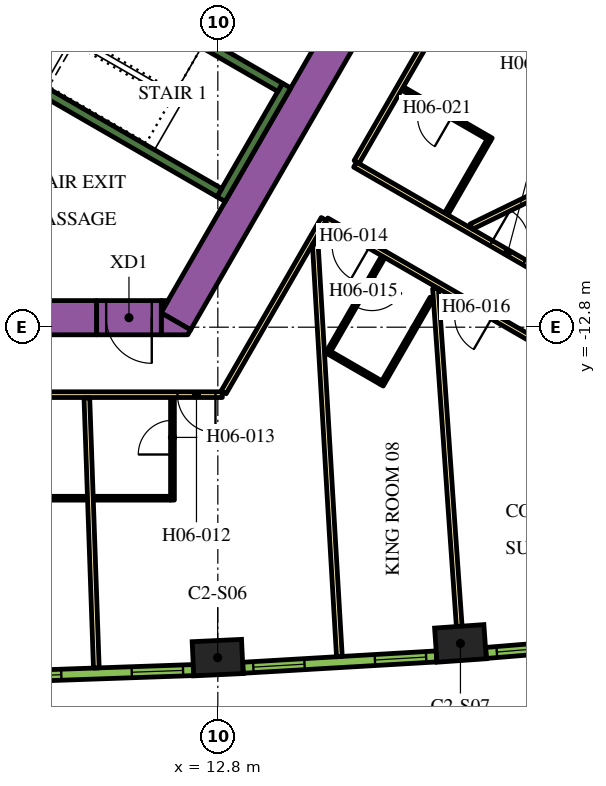
"""IFC4 building model, lengths in metres.
Left out: names, types, materials, properties, quantities, classifications, styles, units other than length and angle.
Written with IfcOpenShell. Run it as: python <this file> out.ifc"""

import sys

from ifc_helpers import new_model, si_unit, direction, frame, frame_2d, origin, origin_2d, place, context, subcontext, project, spatial, polyline, rectangle, outline, extrude, element, fill, save


model = new_model("IFC4")
c1 = context("Model", 3, precision=1e-05, world=origin(), true_north=direction((0.0, 1.0)))
c2 = subcontext(c1, "Body", "Model", "MODEL_VIEW")
j1 = project(units=[si_unit("LENGTHUNIT", "METRE"), si_unit("PLANEANGLEUNIT", "RADIAN")], contexts=[c1])
p1 = place(None, origin())
s1 = spatial("IfcSite", under=j1, at=p1, CompositionType="ELEMENT")
p2 = place(p1, origin())
s2 = spatial("IfcBuilding", under=s1, at=p2, CompositionType="ELEMENT")
p3 = place(p2, frame((0.0, 0.0, 91.5)))
s3 = spatial("IfcBuildingStorey", under=s2, at=p3, CompositionType="ELEMENT", Elevation=91.5)
for number, where, z_axis, x_axis in (
    (1, (12.795, -21.494, 0.0), (0.0, 0.0, 1.0), (0.999, 0.047, 0.0)),
    (2, (19.184, -21.12, 0.0), (0.0, 0.0, 1.0), (0.998, 0.07, 0.0)),
):
    element("IfcColumn", number, at=place(p3, frame(where, z_axis=z_axis, x_axis=x_axis)), inside=s3, PredefinedType="COLUMN", context=c2, shape_type="SweptSolid", body=[
        extrude(rectangle(XDim=1.3, YDim=0.9, at=origin_2d()), origin(), (0.0, 0.0, 1.0), 3.9),
    ])
p4 = place(p3, frame((11.695, -12.644, 0.0), z_axis=(0.0, 0.0, 1.0), x_axis=(0.500010229568, 0.86601949766, 0.0)))
e3 = element("IfcWall", 3, at=p4, inside=s3, PredefinedType="SOLIDWALL", context=c2, shape_type="SweptSolid", body=[
    extrude(rectangle(XDim=9.326, YDim=0.9, at=frame_2d((4.663, 0.0))), origin(), (0.0, 0.0, 1.0), 3.9),
])
p5 = place(p3, origin())
e4 = element("IfcWall", 4, at=p5, inside=s3, PredefinedType="SOLIDWALL", context=c2, shape_type="SweptSolid", body=[
    extrude(outline(polyline([(12.009, -13.0), (11.312, -13.0), (11.312, -12.425), (12.083, -12.871), (12.009, -13.0)])), origin(), (0.0, 0.0, 1.0), 3.9),
])
e5 = element("IfcWall", 5, at=p5, inside=s3, PredefinedType="SOLIDWALL", context=c2, shape_type="SweptSolid", body=[
    extrude(outline(polyline([(11.489, -12.1), (11.312, -12.407), (11.312, -12.1), (11.489, -12.1)])), origin(), (0.0, 0.0, 1.0), 3.9),
])
p6 = place(p3, frame((-12.019, -12.55, 0.0), z_axis=(0.0, 0.0, 1.0), x_axis=(1.0, 0.0, 0.0)))
e6 = element("IfcWall", 6, at=p6, inside=s3, PredefinedType="SOLIDWALL", context=c2, shape_type="SweptSolid", body=[
    extrude(rectangle(XDim=21.63, YDim=0.9, at=frame_2d((10.815, 0.0))), origin(), (0.0, 0.0, 1.0), 3.9),
])
p7 = place(p3, frame((12.885, -9.431, 0.0), z_axis=(0.0, 0.0, 1.0), x_axis=(0.500020560727, 0.866013532718, 0.0)))
e7 = element("IfcWall", 7, at=p7, inside=s3, PredefinedType="SOLIDWALL", context=c2, shape_type="SweptSolid", body=[
    extrude(rectangle(XDim=3.45, YDim=0.25, at=frame_2d((1.725, 0.0))), origin(), (0.0, 0.0, 1.0), 3.9),
])
p8 = place(p3, frame((12.84, -9.261, 0.0), z_axis=(0.0, 0.0, 1.0), x_axis=(-0.866013990052, 0.500019768644, 0.0)))
e8 = element("IfcWall", 8, at=p8, inside=s3, PredefinedType="SOLIDWALL", context=c2, shape_type="SweptSolid", body=[
    extrude(rectangle(XDim=6.8, YDim=0.25, at=frame_2d((3.4, 0.0))), origin(), (0.0, 0.0, 1.0), 3.9),
])
p9 = place(p3, frame((8.334, -2.964, 0.0), z_axis=(0.0, 0.0, 1.0), x_axis=(0.866016039709, -0.500016218704, 0.0)))
e9 = element("IfcWall", 9, at=p9, inside=s3, PredefinedType="SOLIDWALL", context=c2, shape_type="SweptSolid", body=[
    extrude(rectangle(XDim=7.05, YDim=0.25, at=frame_2d((3.525, 0.0))), origin(), (0.0, 0.0, 1.0), 3.9),
])
p10 = place(p3, frame((11.312, -12.55, 0.0), z_axis=(0.0, 0.0, 1.0), x_axis=(-1.0, 0.0, 0.0)))
e10 = element("IfcWall", 10, at=p10, inside=s3, PredefinedType="SOLIDWALL", context=c2, shape_type="SweptSolid", body=[
    extrude(rectangle(XDim=1.7, YDim=0.9, at=frame_2d((0.85, 0.0))), origin(), (0.0, 0.0, 1.0), 3.9),
])
p11 = place(p10, frame((0.25, 0.0, 0.0)))
e11 = element("IfcOpeningElement", 11, at=p11, cuts=e10, PredefinedType="OPENING", context=c2, shape_type="SweptSolid", body=[
    extrude(rectangle(XDim=1.2, YDim=2.1, at=frame_2d((0.6, 1.05))), frame((0.0, 0.46, 0.0), z_axis=(0.0, -1.0, 0.0), x_axis=(1.0, 0.0, 0.0)), (0.0, 0.0, 1.0), 0.92),
])
p12 = place(p3, frame((16.412, -8.523, 0.0), z_axis=(0.0, 0.0, 1.0), x_axis=(0.866025629663, -0.499999608766, 0.0)))
e12 = element("IfcWall", 12, at=p12, inside=s3, PredefinedType="PARTITIONING", context=c2, shape_type="SweptSolid", body=[
    extrude(rectangle(XDim=13.624, YDim=0.15, at=frame_2d((6.812, 0.0))), origin(), (0.0, 0.0, 1.0), 2.75),
])
p13 = place(p12, frame((4.134, 0.0, 0.0)))
e13 = element("IfcOpeningElement", 13, at=p13, cuts=e12, PredefinedType="OPENING", context=c2, shape_type="SweptSolid", body=[
    extrude(rectangle(XDim=1.0, YDim=2.1, at=frame_2d((0.5, 1.05))), frame((0.0, 0.085, 0.0), z_axis=(0.0, -1.0, 0.0), x_axis=(1.0, 0.0, 0.0)), (0.0, 0.0, 1.0), 0.17),
])
p14 = place(p3, frame((19.081, -3.9, 0.0), z_axis=(0.0, 0.0, 1.0), x_axis=(-0.499974327079, -0.866040225545, 0.0)))
e14 = element("IfcWall", 14, at=p14, inside=s3, PredefinedType="PARTITIONING", context=c2, shape_type="SweptSolid", body=[
    extrude(rectangle(XDim=5.258, YDim=0.15, at=frame_2d((2.629, 0.0))), origin(), (0.0, 0.0, 1.0), 2.75),
])
p15 = place(p14, frame((0.18, 0.0, 0.0)))
e15 = element("IfcOpeningElement", 15, at=p15, cuts=e14, PredefinedType="OPENING", context=c2, shape_type="SweptSolid", body=[
    extrude(rectangle(XDim=1.0, YDim=2.1, at=frame_2d((0.5, 1.05))), frame((0.0, 0.085, 0.0), z_axis=(0.0, -1.0, 0.0), x_axis=(1.0, 0.0, 0.0)), (0.0, 0.0, 1.0), 0.17),
])
p16 = place(p3, frame((12.918, -14.575, 0.0), z_axis=(0.0, 0.0, 1.0), x_axis=(-1.0, 0.0, 0.0)))
e16 = element("IfcWall", 16, at=p16, inside=s3, PredefinedType="PARTITIONING", context=c2, shape_type="SweptSolid", body=[
    extrude(rectangle(XDim=25.766, YDim=0.15, at=frame_2d((12.883, 0.0))), origin(), (0.0, 0.0, 1.0), 2.75),
])
p17 = place(p16, frame((19.306, 0.0, 0.0)))
e17 = element("IfcOpeningElement", 17, at=p17, cuts=e16, PredefinedType="OPENING", context=c2, shape_type="SweptSolid", body=[
    extrude(rectangle(XDim=1.0, YDim=2.1, at=frame_2d((0.5, 1.05))), frame((0.0, 0.085, 0.0), z_axis=(0.0, -1.0, 0.0), x_axis=(1.0, 0.0, 0.0)), (0.0, 0.0, 1.0), 0.17),
])
p18 = place(p16, frame((17.999, 0.0, 0.0)))
e18 = element("IfcOpeningElement", 18, at=p18, cuts=e16, PredefinedType="OPENING", context=c2, shape_type="SweptSolid", body=[
    extrude(rectangle(XDim=1.0, YDim=2.1, at=frame_2d((0.5, 1.05))), frame((0.0, 0.085, 0.0), z_axis=(0.0, -1.0, 0.0), x_axis=(1.0, 0.0, 0.0)), (0.0, 0.0, 1.0), 0.17),
])
p19 = place(p16, frame((10.874, 0.0, 0.0)))
e19 = element("IfcOpeningElement", 19, at=p19, cuts=e16, PredefinedType="OPENING", context=c2, shape_type="SweptSolid", body=[
    extrude(rectangle(XDim=0.9, YDim=2.1, at=frame_2d((0.45, 1.05))), frame((0.0, 0.085, 0.0), z_axis=(0.0, -1.0, 0.0), x_axis=(1.0, 0.0, 0.0)), (0.0, 0.0, 1.0), 0.17),
])
p20 = place(p16, frame((8.647, 0.0, 0.0)))
e20 = element("IfcOpeningElement", 20, at=p20, cuts=e16, PredefinedType="OPENING", context=c2, shape_type="SweptSolid", body=[
    extrude(rectangle(XDim=1.0, YDim=2.1, at=frame_2d((0.5, 1.05))), frame((0.0, 0.085, 0.0), z_axis=(0.0, -1.0, 0.0), x_axis=(1.0, 0.0, 0.0)), (0.0, 0.0, 1.0), 0.17),
])
p21 = place(p16, frame((0.18, 0.0, 0.0)))
e21 = element("IfcOpeningElement", 21, at=p21, cuts=e16, PredefinedType="OPENING", context=c2, shape_type="SweptSolid", body=[
    extrude(rectangle(XDim=1.0, YDim=2.1, at=frame_2d((0.5, 1.05))), frame((0.0, 0.085, 0.0), z_axis=(0.0, -1.0, 0.0), x_axis=(1.0, 0.0, 0.0)), (0.0, 0.0, 1.0), 0.17),
])
p22 = place(p3, frame((15.587, -9.952, 0.0), z_axis=(0.0, 0.0, 1.0), x_axis=(-0.500016618951, -0.866015808616, 0.0)))
e22 = element("IfcWall", 22, at=p22, inside=s3, PredefinedType="PARTITIONING", context=c2, shape_type="SweptSolid", body=[
    extrude(rectangle(XDim=5.268, YDim=0.15, at=frame_2d((2.634, 0.0))), origin(), (0.0, 0.0, 1.0), 2.75),
])
p23 = place(p3, frame((27.386, -16.764, 0.0), z_axis=(0.0, 0.0, 1.0), x_axis=(-0.866022585856, 0.500004880763, 0.0)))
e23 = element("IfcWall", 23, at=p23, inside=s3, PredefinedType="PARTITIONING", context=c2, shape_type="SweptSolid", body=[
    extrude(rectangle(XDim=13.544, YDim=0.15, at=frame_2d((6.772, 0.0))), origin(), (0.0, 0.0, 1.0), 2.75),
])
p24 = place(p23, frame((12.214, 0.0, 0.0)))
e24 = element("IfcOpeningElement", 24, at=p24, cuts=e23, PredefinedType="OPENING", context=c2, shape_type="SweptSolid", body=[
    extrude(rectangle(XDim=1.0, YDim=2.1, at=frame_2d((0.5, 1.05))), frame((0.0, 0.085, 0.0), z_axis=(0.0, -1.0, 0.0), x_axis=(1.0, 0.0, 0.0)), (0.0, 0.0, 1.0), 0.17),
])
p25 = place(p23, frame((8.49, 0.0, 0.0)))
e25 = element("IfcOpeningElement", 25, at=p25, cuts=e23, PredefinedType="OPENING", context=c2, shape_type="SweptSolid", body=[
    extrude(rectangle(XDim=1.0, YDim=2.1, at=frame_2d((0.5, 1.05))), frame((0.0, 0.085, 0.0), z_axis=(0.0, -1.0, 0.0), x_axis=(1.0, 0.0, 0.0)), (0.0, 0.0, 1.0), 0.17),
])
p26 = place(p3, frame((9.603, -21.767, 0.0), z_axis=(0.0, 0.0, 1.0), x_axis=(-0.035053506859, 0.999385436985, 0.0)))
e26 = element("IfcWall", 26, at=p26, inside=s3, PredefinedType="PARTITIONING", context=c2, shape_type="SweptSolid", body=[
    extrude(rectangle(XDim=7.111, YDim=0.15, at=frame_2d((3.556, 0.0))), origin(), (0.0, 0.0, 1.0), 2.75),
])
p27 = place(p3, frame((15.999, -21.467, 0.0), z_axis=(0.0, 0.0, 1.0), x_axis=(-0.058433825336, 0.998291284173, 0.0)))
e27 = element("IfcWall", 27, at=p27, inside=s3, PredefinedType="PARTITIONING", context=c2, shape_type="SweptSolid", body=[
    extrude(rectangle(XDim=10.875, YDim=0.15, at=frame_2d((5.438, 0.0))), origin(), (0.0, 0.0, 1.0), 2.75),
])
p28 = place(p3, frame((19.153, -20.671, 0.0), z_axis=(0.0, 0.0, 1.0), x_axis=(-0.070070736723, 0.997542025107, 0.0)))
e28 = element("IfcWall", 28, at=p28, inside=s3, PredefinedType="PARTITIONING", context=c2, shape_type="SweptSolid", body=[
    extrude(rectangle(XDim=8.909, YDim=0.15, at=frame_2d((4.455, 0.0))), origin(), (0.0, 0.0, 1.0), 2.75),
])
p29 = place(p3, frame((27.479, -6.251, 0.0), z_axis=(0.0, 0.0, 1.0), x_axis=(-0.898945877276, -0.438059710231, 0.0)))
e29 = element("IfcWall", 29, at=p29, inside=s3, PredefinedType="PARTITIONING", context=c2, shape_type="SweptSolid", body=[
    extrude(rectangle(XDim=8.909, YDim=0.15, at=frame_2d((4.455, 0.0))), origin(), (0.0, 0.0, 1.0), 2.75),
])
p30 = place(p3, frame((7.15, -17.3, 0.0), z_axis=(0.0, 0.0, 1.0), x_axis=(1.0, 0.0, 0.0)))
e30 = element("IfcWall", 30, at=p30, inside=s3, PredefinedType="PARTITIONING", context=c2, shape_type="SweptSolid", body=[
    extrude(rectangle(XDim=2.22, YDim=0.1, at=frame_2d((1.11, 0.0))), origin(), (0.0, 0.0, 1.0), 2.75),
])
p31 = place(p3, frame((11.607, -17.35, 0.0), z_axis=(0.0, 0.0, 1.0), x_axis=(0.0, 1.0, 0.0)))
e31 = element("IfcWall", 31, at=p31, inside=s3, PredefinedType="PARTITIONING", context=c2, shape_type="SweptSolid", body=[
    extrude(rectangle(XDim=2.7, YDim=0.1, at=frame_2d((1.35, 0.0))), origin(), (0.0, 0.0, 1.0), 2.75),
])
p32 = place(p31, frame((1.2, 0.0, 0.0)))
e32 = element("IfcOpeningElement", 32, at=p32, cuts=e31, PredefinedType="OPENING", context=c2, shape_type="SweptSolid", body=[
    extrude(rectangle(XDim=0.9, YDim=2.1, at=frame_2d((0.45, 1.05))), frame((0.0, 0.06, 0.0), z_axis=(0.0, -1.0, 0.0), x_axis=(1.0, 0.0, 0.0)), (0.0, 0.0, 1.0), 0.12),
])
p33 = place(p3, frame((11.557, -17.3, 0.0), z_axis=(0.0, 0.0, 1.0), x_axis=(-1.0, 0.0, 0.0)))
e33 = element("IfcWall", 33, at=p33, inside=s3, PredefinedType="PARTITIONING", context=c2, shape_type="SweptSolid", body=[
    extrude(rectangle(XDim=2.03, YDim=0.1, at=frame_2d((1.015, 0.0))), origin(), (0.0, 0.0, 1.0), 2.75),
])
p34 = place(p3, frame((17.155, -10.944, 0.0), z_axis=(0.0, 0.0, 1.0), x_axis=(-0.499939757307, -0.866060182126, 0.0)))
e34 = element("IfcWall", 34, at=p34, inside=s3, PredefinedType="PARTITIONING", context=c2, shape_type="SweptSolid", body=[
    extrude(rectangle(XDim=2.95, YDim=0.1, at=frame_2d((1.475, 0.0))), origin(), (0.0, 0.0, 1.0), 2.75),
])
p35 = place(p34, frame((0.6, 0.0, 0.0)))
e35 = element("IfcOpeningElement", 35, at=p35, cuts=e34, PredefinedType="OPENING", context=c2, shape_type="SweptSolid", body=[
    extrude(rectangle(XDim=0.9, YDim=2.1, at=frame_2d((0.45, 1.05))), frame((0.0, 0.06, 0.0), z_axis=(0.0, -1.0, 0.0), x_axis=(1.0, 0.0, 0.0)), (0.0, 0.0, 1.0), 0.12),
])
p36 = place(p3, frame((15.748, -13.48, 0.0), z_axis=(0.0, 0.0, 1.0), x_axis=(0.866083307622, -0.499899694197, 0.0)))
e36 = element("IfcWall", 36, at=p36, inside=s3, PredefinedType="PARTITIONING", context=c2, shape_type="SweptSolid", body=[
    extrude(rectangle(XDim=1.55, YDim=0.1, at=frame_2d((0.775, 0.0))), origin(), (0.0, 0.0, 1.0), 2.75),
])
p37 = place(p3, frame((18.429, -12.037, 0.0), z_axis=(0.0, 0.0, 1.0), x_axis=(-0.500007957085, -0.86602080971, 0.0)))
e37 = element("IfcWall", 37, at=p37, inside=s3, PredefinedType="PARTITIONING", context=c2, shape_type="SweptSolid", body=[
    extrude(rectangle(XDim=2.64, YDim=0.1, at=frame_2d((1.32, 0.0))), origin(), (0.0, 0.0, 1.0), 2.75),
])
p38 = place(p3, frame((19.996, -7.867, 0.0), z_axis=(0.0, 0.0, 1.0), x_axis=(-0.866019956843, 0.50000943426, 0.0)))
e38 = element("IfcWall", 38, at=p38, inside=s3, PredefinedType="PARTITIONING", context=c2, shape_type="SweptSolid", body=[
    extrude(rectangle(XDim=2.7, YDim=0.1, at=frame_2d((1.35, 0.0))), origin(), (0.0, 0.0, 1.0), 2.75),
])
p39 = place(p38, frame((1.2, 0.0, 0.0)))
e39 = element("IfcOpeningElement", 39, at=p39, cuts=e38, PredefinedType="OPENING", context=c2, shape_type="SweptSolid", body=[
    extrude(rectangle(XDim=0.9, YDim=2.1, at=frame_2d((0.45, 1.05))), frame((0.0, 0.06, 0.0), z_axis=(0.0, -1.0, 0.0), x_axis=(1.0, 0.0, 0.0)), (0.0, 0.0, 1.0), 0.12),
])
p40 = place(p3, frame((19.922, -7.894, 0.0), z_axis=(0.0, 0.0, 1.0), x_axis=(-0.499995378973, -0.866028071719, 0.0)))
e40 = element("IfcWall", 40, at=p40, inside=s3, PredefinedType="PARTITIONING", context=c2, shape_type="SweptSolid", body=[
    extrude(rectangle(XDim=2.22, YDim=0.1, at=frame_2d((1.11, 0.0))), origin(), (0.0, 0.0, 1.0), 2.75),
])
p41 = place(p3, frame((7.059, -22.001, 0.0), z_axis=(0.0, 0.0, 1.0), x_axis=(0.999385993957, 0.035037623812, 0.0)))
e41 = element("IfcWall", 41, at=p41, inside=s3, PredefinedType="SOLIDWALL", context=c2, shape_type="SweptSolid", body=[
    extrude(rectangle(XDim=5.101, YDim=0.29, at=frame_2d((2.55, 0.0))), origin(), (0.0, 0.0, 1.0), 3.65),
])
p42 = place(p41, frame((0.273, 0.0, 0.9)))
e42 = element("IfcOpeningElement", 42, at=p42, cuts=e41, PredefinedType="OPENING", context=c2, shape_type="SweptSolid", body=[
    extrude(rectangle(XDim=1.35, YDim=2.15, at=frame_2d((0.675, 1.075))), frame((0.0, 0.155, 0.0), z_axis=(0.0, -1.0, 0.0), x_axis=(1.0, 0.0, 0.0)), (0.0, 0.0, 1.0), 0.31),
])
p43 = place(p41, frame((3.478, 0.0, 0.9)))
e43 = element("IfcOpeningElement", 43, at=p43, cuts=e41, PredefinedType="OPENING", context=c2, shape_type="SweptSolid", body=[
    extrude(rectangle(XDim=1.35, YDim=2.15, at=frame_2d((0.675, 1.075))), frame((0.0, 0.155, 0.0), z_axis=(0.0, -1.0, 0.0), x_axis=(1.0, 0.0, 0.0)), (0.0, 0.0, 1.0), 0.31),
])
p44 = place(p3, frame((13.462, -21.761, 0.0), z_axis=(0.0, 0.0, 1.0), x_axis=(0.998290511436, 0.058447025388, 0.0)))
e44 = element("IfcWall", 44, at=p44, inside=s3, PredefinedType="SOLIDWALL", context=c2, shape_type="SweptSolid", body=[
    extrude(rectangle(XDim=5.1, YDim=0.29, at=frame_2d((2.55, 0.0))), origin(), (0.0, 0.0, 1.0), 3.65),
])
p45 = place(p44, frame((0.272, 0.0, 0.9)))
e45 = element("IfcOpeningElement", 45, at=p45, cuts=e44, PredefinedType="OPENING", context=c2, shape_type="SweptSolid", body=[
    extrude(rectangle(XDim=1.35, YDim=2.15, at=frame_2d((0.675, 1.075))), frame((0.0, 0.155, 0.0), z_axis=(0.0, -1.0, 0.0), x_axis=(1.0, 0.0, 0.0)), (0.0, 0.0, 1.0), 0.31),
])
p46 = place(p44, frame((3.478, 0.0, 0.9)))
e46 = element("IfcOpeningElement", 46, at=p46, cuts=e44, PredefinedType="OPENING", context=c2, shape_type="SweptSolid", body=[
    extrude(rectangle(XDim=1.35, YDim=2.15, at=frame_2d((0.675, 1.075))), frame((0.0, 0.155, 0.0), z_axis=(0.0, -1.0, 0.0), x_axis=(1.0, 0.0, 0.0)), (0.0, 0.0, 1.0), 0.31),
])
p47 = place(p3, frame((19.857, -21.371, 0.0), z_axis=(0.0, 0.0, 1.0), x_axis=(0.99665273362, 0.081751627308, 0.0)))
e47 = element("IfcWall", 47, at=p47, inside=s3, PredefinedType="SOLIDWALL", context=c2, shape_type="SweptSolid", body=[
    extrude(rectangle(XDim=5.107, YDim=0.29, at=frame_2d((2.553, 0.0))), origin(), (0.0, 0.0, 1.0), 3.65),
])
p48 = place(p47, frame((0.285, 0.0, 0.9)))
e48 = element("IfcOpeningElement", 48, at=p48, cuts=e47, PredefinedType="OPENING", context=c2, shape_type="SweptSolid", body=[
    extrude(rectangle(XDim=1.35, YDim=2.15, at=frame_2d((0.675, 1.075))), frame((0.0, 0.155, 0.0), z_axis=(0.0, -1.0, 0.0), x_axis=(1.0, 0.0, 0.0)), (0.0, 0.0, 1.0), 0.31),
])
p49 = place(p47, frame((3.516, 0.0, 0.9)))
e49 = element("IfcOpeningElement", 49, at=p49, cuts=e47, PredefinedType="OPENING", context=c2, shape_type="SweptSolid", body=[
    extrude(rectangle(XDim=1.35, YDim=2.15, at=frame_2d((0.675, 1.075))), frame((0.0, 0.155, 0.0), z_axis=(0.0, -1.0, 0.0), x_axis=(1.0, 0.0, 0.0)), (0.0, 0.0, 1.0), 0.31),
])
p50 = place(p11, origin())
e50 = element("IfcDoor", 50, at=p50, inside=s3, OperationType="SINGLE_SWING_LEFT", PredefinedType="DOOR", context=c2, shape_type="SweptSolid", body=[
    extrude(rectangle(XDim=1.2, YDim=2.1, at=frame_2d((0.6, 1.05))), frame((0.0, 0.025, 0.0), z_axis=(0.0, -1.0, 0.0), x_axis=(1.0, 0.0, 0.0)), (0.0, 0.0, 1.0), 0.05),
])
fill(e11, e50)
p51 = place(p21, origin())
e51 = element("IfcDoor", 51, at=p51, inside=s3, OperationType="SINGLE_SWING_LEFT", PredefinedType="DOOR", context=c2, shape_type="SweptSolid", body=[
    extrude(rectangle(XDim=1.0, YDim=2.1, at=frame_2d((0.5, 1.05))), frame((0.0, 0.025, 0.0), z_axis=(0.0, -1.0, 0.0), x_axis=(1.0, 0.0, 0.0)), (0.0, 0.0, 1.0), 0.05),
])
fill(e21, e51)
p52 = place(p32, origin())
e52 = element("IfcDoor", 52, at=p52, inside=s3, OperationType="SINGLE_SWING_LEFT", PredefinedType="DOOR", context=c2, shape_type="SweptSolid", body=[
    extrude(rectangle(XDim=0.9, YDim=2.1, at=frame_2d((0.45, 1.05))), frame((0.0, 0.025, 0.0), z_axis=(0.0, -1.0, 0.0), x_axis=(1.0, 0.0, 0.0)), (0.0, 0.0, 1.0), 0.05),
])
fill(e32, e52)
p53 = place(p24, origin())
e53 = element("IfcDoor", 53, at=p53, inside=s3, OperationType="SINGLE_SWING_RIGHT", PredefinedType="DOOR", context=c2, shape_type="SweptSolid", body=[
    extrude(rectangle(XDim=1.0, YDim=2.1, at=frame_2d((0.5, 1.05))), frame((0.0, 0.025, 0.0), z_axis=(0.0, -1.0, 0.0), x_axis=(1.0, 0.0, 0.0)), (0.0, 0.0, 1.0), 0.05),
])
fill(e24, e53)
p54 = place(p35, origin())
e54 = element("IfcDoor", 54, at=p54, inside=s3, OperationType="SINGLE_SWING_LEFT", PredefinedType="DOOR", context=c2, shape_type="SweptSolid", body=[
    extrude(rectangle(XDim=0.9, YDim=2.1, at=frame_2d((0.45, 1.05))), frame((0.0, 0.025, 0.0), z_axis=(0.0, -1.0, 0.0), x_axis=(1.0, 0.0, 0.0)), (0.0, 0.0, 1.0), 0.05),
])
fill(e35, e54)
p55 = place(p25, origin())
e55 = element("IfcDoor", 55, at=p55, inside=s3, OperationType="SINGLE_SWING_RIGHT", PredefinedType="DOOR", context=c2, shape_type="SweptSolid", body=[
    extrude(rectangle(XDim=1.0, YDim=2.1, at=frame_2d((0.5, 1.05))), frame((0.0, 0.025, 0.0), z_axis=(0.0, -1.0, 0.0), x_axis=(1.0, 0.0, 0.0)), (0.0, 0.0, 1.0), 0.05),
])
fill(e25, e55)
p56 = place(p13, origin())
e56 = element("IfcDoor", 56, at=p56, inside=s3, OperationType="SINGLE_SWING_LEFT", PredefinedType="DOOR", context=c2, shape_type="SweptSolid", body=[
    extrude(rectangle(XDim=1.0, YDim=2.1, at=frame_2d((0.5, 1.05))), frame((0.0, 0.025, 0.0), z_axis=(0.0, -1.0, 0.0), x_axis=(1.0, 0.0, 0.0)), (0.0, 0.0, 1.0), 0.05),
])
fill(e13, e56)
p57 = place(p39, origin())
e57 = element("IfcDoor", 57, at=p57, inside=s3, OperationType="SINGLE_SWING_LEFT", PredefinedType="DOOR", context=c2, shape_type="SweptSolid", body=[
    extrude(rectangle(XDim=0.9, YDim=2.1, at=frame_2d((0.45, 1.05))), frame((0.0, 0.025, 0.0), z_axis=(0.0, -1.0, 0.0), x_axis=(1.0, 0.0, 0.0)), (0.0, 0.0, 1.0), 0.05),
])
fill(e39, e57)
p58 = place(p42, origin())
e58 = element("IfcWindow", 58, at=p58, inside=s3, PartitioningType="DOUBLE_PANEL_VERTICAL", PredefinedType="WINDOW", context=c2, shape_type="SweptSolid", body=[
    extrude(rectangle(XDim=1.35, YDim=2.15, at=frame_2d((0.675, 1.075))), frame((0.0, 0.015, 0.0), z_axis=(0.0, -1.0, 0.0), x_axis=(1.0, 0.0, 0.0)), (0.0, 0.0, 1.0), 0.06),
])
fill(e42, e58)
p59 = place(p43, origin())
e59 = element("IfcWindow", 59, at=p59, inside=s3, PartitioningType="DOUBLE_PANEL_VERTICAL", PredefinedType="WINDOW", context=c2, shape_type="SweptSolid", body=[
    extrude(rectangle(XDim=1.35, YDim=2.15, at=frame_2d((0.675, 1.075))), frame((0.0, 0.015, 0.0), z_axis=(0.0, -1.0, 0.0), x_axis=(1.0, 0.0, 0.0)), (0.0, 0.0, 1.0), 0.06),
])
fill(e43, e59)
p60 = place(p45, origin())
e60 = element("IfcWindow", 60, at=p60, inside=s3, PartitioningType="DOUBLE_PANEL_VERTICAL", PredefinedType="WINDOW", context=c2, shape_type="SweptSolid", body=[
    extrude(rectangle(XDim=1.35, YDim=2.15, at=frame_2d((0.675, 1.075))), frame((0.0, 0.015, 0.0), z_axis=(0.0, -1.0, 0.0), x_axis=(1.0, 0.0, 0.0)), (0.0, 0.0, 1.0), 0.06),
])
fill(e45, e60)
p61 = place(p46, origin())
e61 = element("IfcWindow", 61, at=p61, inside=s3, PartitioningType="DOUBLE_PANEL_VERTICAL", PredefinedType="WINDOW", context=c2, shape_type="SweptSolid", body=[
    extrude(rectangle(XDim=1.35, YDim=2.15, at=frame_2d((0.675, 1.075))), frame((0.0, 0.015, 0.0), z_axis=(0.0, -1.0, 0.0), x_axis=(1.0, 0.0, 0.0)), (0.0, 0.0, 1.0), 0.06),
])
fill(e46, e61)
p62 = place(p48, origin())
e62 = element("IfcWindow", 62, at=p62, inside=s3, PartitioningType="DOUBLE_PANEL_VERTICAL", PredefinedType="WINDOW", context=c2, shape_type="SweptSolid", body=[
    extrude(rectangle(XDim=1.35, YDim=2.15, at=frame_2d((0.675, 1.075))), frame((0.0, 0.015, 0.0), z_axis=(0.0, -1.0, 0.0), x_axis=(1.0, 0.0, 0.0)), (0.0, 0.0, 1.0), 0.06),
])
fill(e48, e62)
save(model, sys.argv[1])
